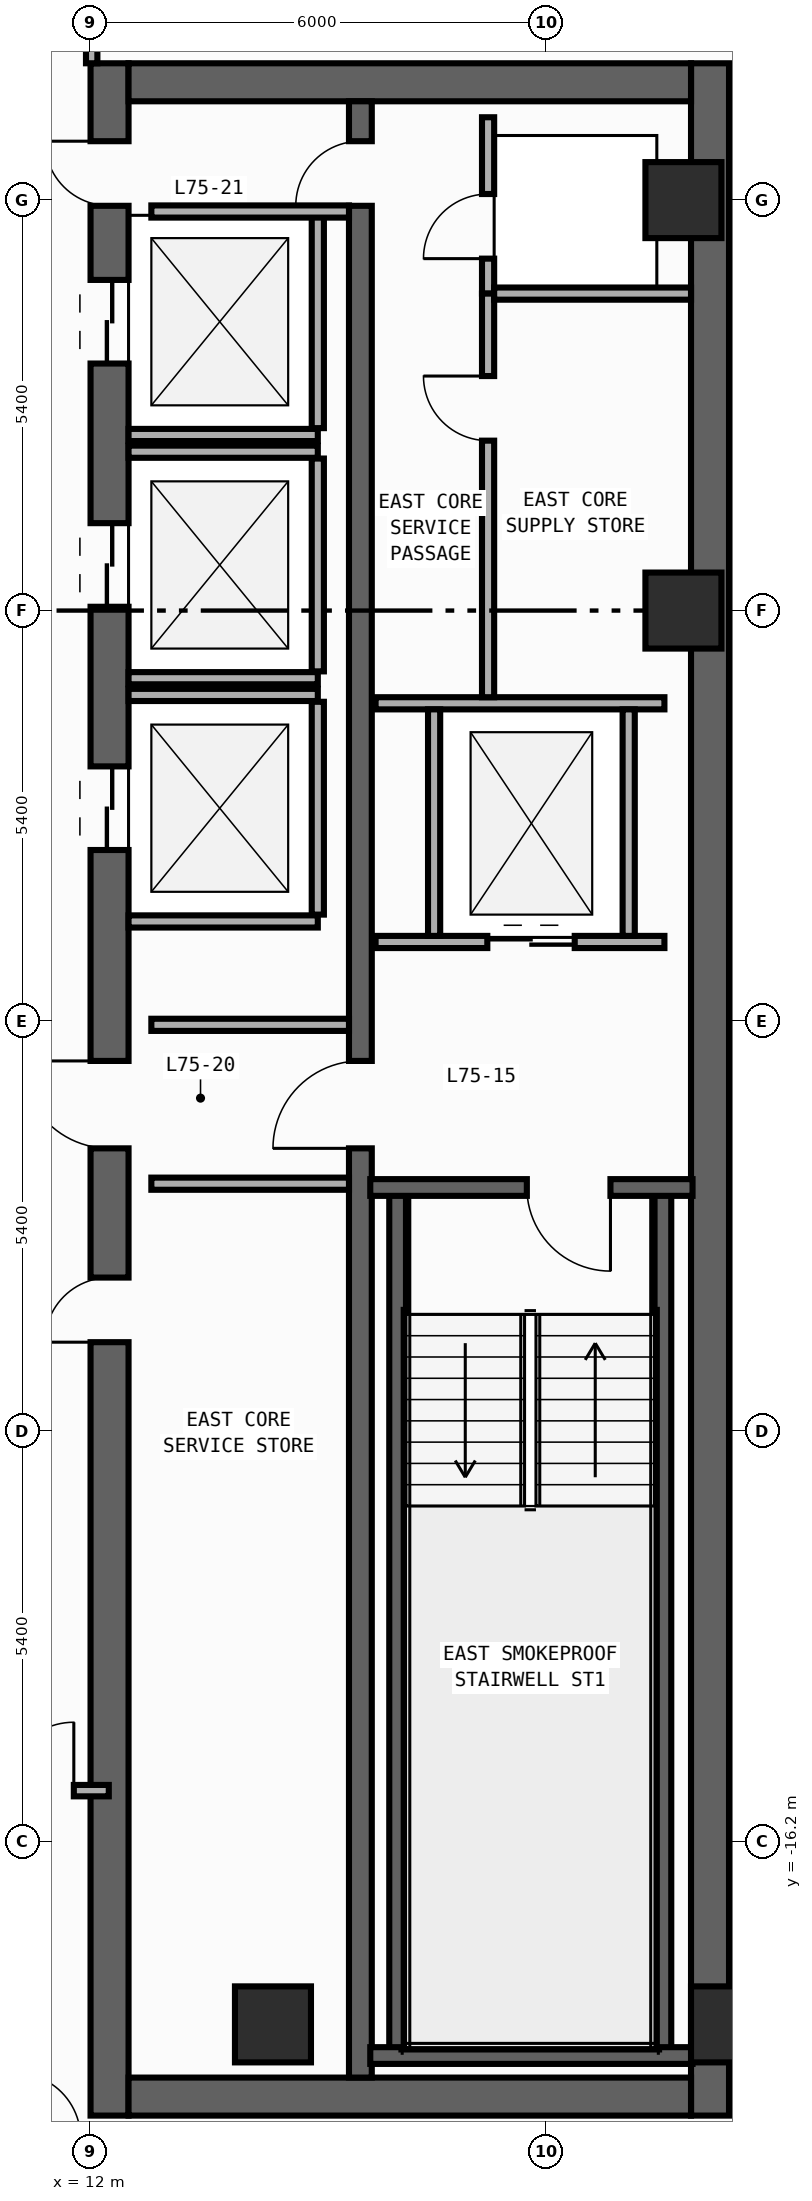
"""IFC4 building model, lengths in metres.
Left out: names, types, materials, properties, quantities, classifications, styles, units other than length and angle.
Written with IfcOpenShell. Run it as: python <this file> out.ifc"""

import sys

from ifc_helpers import new_model, si_unit, direction, frame, frame_2d, origin, origin_2d, place, context, subcontext, project, spatial, rectangle, circle, extrude, element, fill, save


model = new_model("IFC4")
c1 = context("Model", 3, precision=1e-05, world=origin(), true_north=direction((0.0, 1.0)))
c2 = subcontext(c1, "Body", "Model", "MODEL_VIEW")
j1 = project(units=[si_unit("LENGTHUNIT", "METRE"), si_unit("PLANEANGLEUNIT", "RADIAN")], contexts=[c1])
p1 = place(None, origin())
s1 = spatial("IfcSite", under=j1, at=p1, CompositionType="ELEMENT")
p2 = place(p1, origin())
s2 = spatial("IfcBuilding", under=s1, at=p2, CompositionType="ELEMENT")
p3 = place(p2, frame((0.0, 0.0, 311.8)))
s3 = spatial("IfcBuildingStorey", under=s2, at=p3, CompositionType="ELEMENT", Elevation=311.8)
p4 = place(p3, frame((12.25, -19.8, 0.0), z_axis=(0.0, 0.0, 1.0), x_axis=(0.0, 1.0, 0.0)))
e1 = element("IfcWall", 1, at=p4, inside=s3, PredefinedType="SHEAR", context=c2, shape_type="SweptSolid", body=[
    extrude(rectangle(XDim=27.0, YDim=0.5, at=frame_2d((13.5, 0.0))), origin(), (0.0, 0.0, 1.0), 3.54),
])
p5 = place(p4, frame((23.05, 0.0, 0.0)))
e2 = element("IfcOpeningElement", 2, at=p5, cuts=e1, PredefinedType="OPENING", context=c2, shape_type="SweptSolid", body=[
    extrude(rectangle(XDim=1.1, YDim=2.2, at=frame_2d((0.55, 1.1))), frame((0.0, 0.26, 0.0), z_axis=(0.0, -1.0, 0.0), x_axis=(1.0, 0.0, 0.0)), (0.0, 0.0, 1.0), 0.52),
])
p6 = place(p4, frame((19.85, 0.0, 0.0)))
e3 = element("IfcOpeningElement", 3, at=p6, cuts=e1, PredefinedType="OPENING", context=c2, shape_type="SweptSolid", body=[
    extrude(rectangle(XDim=1.1, YDim=2.2, at=frame_2d((0.55, 1.1))), frame((0.0, 0.26, 0.0), z_axis=(0.0, -1.0, 0.0), x_axis=(1.0, 0.0, 0.0)), (0.0, 0.0, 1.0), 0.52),
])
p7 = place(p4, frame((16.65, 0.0, 0.0)))
e4 = element("IfcOpeningElement", 4, at=p7, cuts=e1, PredefinedType="OPENING", context=c2, shape_type="SweptSolid", body=[
    extrude(rectangle(XDim=1.1, YDim=2.2, at=frame_2d((0.55, 1.1))), frame((0.0, 0.26, 0.0), z_axis=(0.0, -1.0, 0.0), x_axis=(1.0, 0.0, 0.0)), (0.0, 0.0, 1.0), 0.52),
])
p8 = place(p4, frame((10.175, 0.0, 0.0)))
e5 = element("IfcOpeningElement", 5, at=p8, cuts=e1, PredefinedType="OPENING", context=c2, shape_type="SweptSolid", body=[
    extrude(rectangle(XDim=0.85, YDim=2.1, at=frame_2d((0.425, 1.05))), frame((0.0, 0.26, 0.0), z_axis=(0.0, -1.0, 0.0), x_axis=(1.0, 0.0, 0.0)), (0.0, 0.0, 1.0), 0.52),
])
p9 = place(p4, frame((12.725, 0.0, 0.0)))
e6 = element("IfcOpeningElement", 6, at=p9, cuts=e1, PredefinedType="OPENING", context=c2, shape_type="SweptSolid", body=[
    extrude(rectangle(XDim=1.15, YDim=2.2, at=frame_2d((0.575, 1.1))), frame((0.0, 0.26, 0.0), z_axis=(0.0, -1.0, 0.0), x_axis=(1.0, 0.0, 0.0)), (0.0, 0.0, 1.0), 0.52),
])
p10 = place(p4, frame((25.125, 0.0, 0.0)))
e7 = element("IfcOpeningElement", 7, at=p10, cuts=e1, PredefinedType="OPENING", context=c2, shape_type="SweptSolid", body=[
    extrude(rectangle(XDim=0.85, YDim=2.1, at=frame_2d((0.425, 1.05))), frame((0.0, 0.26, 0.0), z_axis=(0.0, -1.0, 0.0), x_axis=(1.0, 0.0, 0.0)), (0.0, 0.0, 1.0), 0.52),
])
p11 = place(p3, frame((20.15, -19.8, 0.0), z_axis=(0.0, 0.0, 1.0), x_axis=(0.0, 1.0, 0.0)))
e8 = element("IfcWall", 8, at=p11, inside=s3, PredefinedType="SHEAR", context=c2, shape_type="SweptSolid", body=[
    extrude(rectangle(XDim=27.0, YDim=0.5, at=frame_2d((13.5, 0.0))), origin(), (0.0, 0.0, 1.0), 3.54),
])
for number, where, z_axis, x_axis in (
    (9, (12.5, -19.55, 0.0), (0.0, 0.0, 1.0), (1.0, 0.0, 0.0)),
    (10, (12.5, 6.95, 0.0), (0.0, 0.0, 1.0), (1.0, 0.0, 0.0)),
):
    element("IfcWall", number, at=place(p3, frame(where, z_axis=z_axis, x_axis=x_axis)), inside=s3, PredefinedType="SHEAR", context=c2, shape_type="SweptSolid", body=[
        extrude(rectangle(XDim=7.4, YDim=0.5, at=frame_2d((3.7, 0.0))), origin(), (0.0, 0.0, 1.0), 3.54),
    ])
p12 = place(p3, frame((15.55, -19.3, 0.0), z_axis=(0.0, 0.0, 1.0), x_axis=(0.0, 1.0, 0.0)))
e11 = element("IfcWall", 11, at=p12, inside=s3, PredefinedType="SHEAR", context=c2, shape_type="SweptSolid", body=[
    extrude(rectangle(XDim=26.0, YDim=0.3, at=frame_2d((13.0, 0.0))), origin(), (0.0, 0.0, 1.0), 3.54),
])
p13 = place(p12, frame((12.225, 0.0, 0.0)))
e12 = element("IfcOpeningElement", 12, at=p13, cuts=e11, PredefinedType="OPENING", context=c2, shape_type="SweptSolid", body=[
    extrude(rectangle(XDim=1.15, YDim=2.2, at=frame_2d((0.575, 1.1))), frame((0.0, 0.16, 0.0), z_axis=(0.0, -1.0, 0.0), x_axis=(1.0, 0.0, 0.0)), (0.0, 0.0, 1.0), 0.32),
])
p14 = place(p12, frame((24.625, 0.0, 0.0)))
e13 = element("IfcOpeningElement", 13, at=p14, cuts=e11, PredefinedType="OPENING", context=c2, shape_type="SweptSolid", body=[
    extrude(rectangle(XDim=0.85, YDim=2.1, at=frame_2d((0.425, 1.05))), frame((0.0, 0.16, 0.0), z_axis=(0.0, -1.0, 0.0), x_axis=(1.0, 0.0, 0.0)), (0.0, 0.0, 1.0), 0.32),
])
for number, where, z_axis, x_axis in (
    (14, (16.04, -19.01, 0.0), (0.0, 0.0, 1.0), (0.0, 1.0, 0.0)),
    (15, (19.53, -19.01, 0.0), (0.0, 0.0, 1.0), (0.0, 1.0, 0.0)),
):
    element("IfcWall", number, at=place(p3, frame(where, z_axis=z_axis, x_axis=x_axis)), inside=s3, PredefinedType="SHEAR", context=c2, shape_type="SweptSolid", body=[
        extrude(rectangle(XDim=11.42, YDim=0.22, at=frame_2d((5.71, 0.0))), origin(), (0.0, 0.0, 1.0), 3.54),
    ])
p15 = place(p3, frame((15.68, -19.01, 0.0), z_axis=(0.0, 0.0, 1.0), x_axis=(1.0, 0.0, 0.0)))
e16 = element("IfcWall", 16, at=p15, inside=s3, PredefinedType="SHEAR", context=c2, shape_type="SweptSolid", body=[
    extrude(rectangle(XDim=4.24, YDim=0.22, at=frame_2d((2.12, 0.0))), origin(), (0.0, 0.0, 1.0), 3.54),
])
p16 = place(p3, frame((19.92, -7.59, 0.0), z_axis=(0.0, 0.0, 1.0), x_axis=(-1.0, 0.0, 0.0)))
e17 = element("IfcWall", 17, at=p16, inside=s3, PredefinedType="SHEAR", context=c2, shape_type="SweptSolid", body=[
    extrude(rectangle(XDim=4.24, YDim=0.22, at=frame_2d((2.12, 0.0))), origin(), (0.0, 0.0, 1.0), 3.54),
])
p17 = place(p16, frame((1.08, 0.0, 0.0)))
e18 = element("IfcOpeningElement", 18, at=p17, cuts=e17, PredefinedType="OPENING", context=c2, shape_type="SweptSolid", body=[
    extrude(rectangle(XDim=1.1, YDim=2.2, at=frame_2d((0.55, 1.1))), frame((0.0, 0.12, 0.0), z_axis=(0.0, -1.0, 0.0), x_axis=(1.0, 0.0, 0.0)), (0.0, 0.0, 1.0), 0.24),
])
for number, where, z_axis, x_axis in (
    (19, (20.4, -18.6, 0.0), (0.0, 0.0, 1.0), (1.0, 0.0, 0.0)),
    (20, (14.4, -18.6, 0.0), (0.0, 0.0, 1.0), (1.0, 0.0, 0.0)),
    (21, (19.8, 0.0, 0.0), (0.0, 0.0, 1.0), (1.0, 0.0, 0.0)),
    (22, (19.8, 5.4, 0.0), (0.0, 0.0, 1.0), (1.0, 0.0, 0.0)),
):
    element("IfcColumn", number, at=place(p3, frame(where, z_axis=z_axis, x_axis=x_axis)), inside=s3, PredefinedType="COLUMN", context=c2, shape_type="SweptSolid", body=[
        extrude(circle(Radius=0.5, at=origin_2d()), origin(), (0.0, 0.0, 1.0), 3.8),
    ])
p18 = place(p3, frame((12.5, 2.31, 0.0), z_axis=(0.0, 0.0, 1.0), x_axis=(1.0, 0.0, 0.0)))
e23 = element("IfcWall", 23, at=p18, inside=s3, PredefinedType="STANDARD", context=c2, shape_type="SweptSolid", body=[
    extrude(rectangle(XDim=2.49, YDim=0.16, at=frame_2d((1.245, 0.0))), origin(), (0.0, 0.0, 1.0), 3.54),
])
p19 = place(p3, frame((14.99, 2.4, 0.0), z_axis=(0.0, 0.0, 1.0), x_axis=(0.0, 1.0, 0.0)))
e24 = element("IfcWall", 24, at=p19, inside=s3, PredefinedType="STANDARD", context=c2, shape_type="SweptSolid", body=[
    extrude(rectangle(XDim=2.8, YDim=0.16, at=frame_2d((1.4, 0.0))), origin(), (0.0, 0.0, 1.0), 3.54),
])
for number, where, z_axis, x_axis in (
    (25, (12.5, -0.89, 0.0), (0.0, 0.0, 1.0), (1.0, 0.0, 0.0)),
    (26, (12.5, 2.09, 0.0), (0.0, 0.0, 1.0), (1.0, 0.0, 0.0)),
):
    element("IfcWall", number, at=place(p3, frame(where, z_axis=z_axis, x_axis=x_axis)), inside=s3, PredefinedType="STANDARD", context=c2, shape_type="SweptSolid", body=[
        extrude(rectangle(XDim=2.49, YDim=0.16, at=frame_2d((1.245, 0.0))), origin(), (0.0, 0.0, 1.0), 3.54),
    ])
p20 = place(p3, frame((14.99, -0.8, 0.0), z_axis=(0.0, 0.0, 1.0), x_axis=(0.0, 1.0, 0.0)))
e27 = element("IfcWall", 27, at=p20, inside=s3, PredefinedType="STANDARD", context=c2, shape_type="SweptSolid", body=[
    extrude(rectangle(XDim=2.8, YDim=0.16, at=frame_2d((1.4, 0.0))), origin(), (0.0, 0.0, 1.0), 3.54),
])
for number, where, z_axis, x_axis in (
    (28, (12.5, -4.09, 0.0), (0.0, 0.0, 1.0), (1.0, 0.0, 0.0)),
    (29, (12.5, -1.11, 0.0), (0.0, 0.0, 1.0), (1.0, 0.0, 0.0)),
):
    element("IfcWall", number, at=place(p3, frame(where, z_axis=z_axis, x_axis=x_axis)), inside=s3, PredefinedType="STANDARD", context=c2, shape_type="SweptSolid", body=[
        extrude(rectangle(XDim=2.49, YDim=0.16, at=frame_2d((1.245, 0.0))), origin(), (0.0, 0.0, 1.0), 3.54),
    ])
p21 = place(p3, frame((14.99, -4.0, 0.0), z_axis=(0.0, 0.0, 1.0), x_axis=(0.0, 1.0, 0.0)))
e30 = element("IfcWall", 30, at=p21, inside=s3, PredefinedType="STANDARD", context=c2, shape_type="SweptSolid", body=[
    extrude(rectangle(XDim=2.8, YDim=0.16, at=frame_2d((1.4, 0.0))), origin(), (0.0, 0.0, 1.0), 3.54),
])
p22 = place(p3, frame((15.75, -4.36, 0.0), z_axis=(0.0, 0.0, 1.0), x_axis=(1.0, 0.0, 0.0)))
e31 = element("IfcWall", 31, at=p22, inside=s3, PredefinedType="STANDARD", context=c2, shape_type="SweptSolid", body=[
    extrude(rectangle(XDim=3.8, YDim=0.16, at=frame_2d((1.9, 0.0))), origin(), (0.0, 0.0, 1.0), 3.54),
])
p23 = place(p22, frame((1.47, 0.0, 0.0)))
e32 = element("IfcOpeningElement", 32, at=p23, cuts=e31, PredefinedType="OPENING", context=c2, shape_type="SweptSolid", body=[
    extrude(rectangle(XDim=1.15, YDim=2.2, at=frame_2d((0.575, 1.1))), frame((0.0, 0.09, 0.0), z_axis=(0.0, -1.0, 0.0), x_axis=(1.0, 0.0, 0.0)), (0.0, 0.0, 1.0), 0.18),
])
p24 = place(p3, frame((15.75, -1.22, 0.0), z_axis=(0.0, 0.0, 1.0), x_axis=(1.0, 0.0, 0.0)))
e33 = element("IfcWall", 33, at=p24, inside=s3, PredefinedType="STANDARD", context=c2, shape_type="SweptSolid", body=[
    extrude(rectangle(XDim=3.8, YDim=0.16, at=frame_2d((1.9, 0.0))), origin(), (0.0, 0.0, 1.0), 3.54),
])
for number, where, z_axis, x_axis in (
    (34, (16.52, -4.28, 0.0), (0.0, 0.0, 1.0), (0.0, 1.0, 0.0)),
    (35, (19.08, -4.28, 0.0), (0.0, 0.0, 1.0), (0.0, 1.0, 0.0)),
):
    element("IfcWall", number, at=place(p3, frame(where, z_axis=z_axis, x_axis=x_axis)), inside=s3, PredefinedType="STANDARD", context=c2, shape_type="SweptSolid", body=[
        extrude(rectangle(XDim=2.98, YDim=0.16, at=frame_2d((1.49, 0.0))), origin(), (0.0, 0.0, 1.0), 3.54),
    ])
for number, where, z_axis, x_axis in (
    (36, (12.8, -5.45, 0.0), (0.0, 0.0, 1.0), (1.0, 0.0, 0.0)),
    (37, (12.8, -7.54, 0.0), (0.0, 0.0, 1.0), (1.0, 0.0, 0.0)),
    (38, (12.8, 5.25, 0.0), (0.0, 0.0, 1.0), (1.0, 0.0, 0.0)),
):
    element("IfcWall", number, at=place(p3, frame(where, z_axis=z_axis, x_axis=x_axis)), inside=s3, PredefinedType="STANDARD", context=c2, shape_type="SweptSolid", body=[
        extrude(rectangle(XDim=2.6, YDim=0.16, at=frame_2d((1.3, 0.0))), origin(), (0.0, 0.0, 1.0), 3.54),
    ])
p25 = place(p3, frame((17.23, 4.17, 0.0), z_axis=(0.0, 0.0, 1.0), x_axis=(0.0, 1.0, 0.0)))
e39 = element("IfcWall", 39, at=p25, inside=s3, PredefinedType="PARTITIONING", context=c2, shape_type="SweptSolid", body=[
    extrude(rectangle(XDim=2.32, YDim=0.16, at=frame_2d((1.16, 0.0))), origin(), (0.0, 0.0, 1.0), 3.54),
])
p26 = place(p25, frame((0.46, 0.0, 0.0)))
e40 = element("IfcOpeningElement", 40, at=p26, cuts=e39, PredefinedType="OPENING", context=c2, shape_type="SweptSolid", body=[
    extrude(rectangle(XDim=0.85, YDim=2.1, at=frame_2d((0.425, 1.05))), frame((0.0, 0.09, 0.0), z_axis=(0.0, -1.0, 0.0), x_axis=(1.0, 0.0, 0.0)), (0.0, 0.0, 1.0), 0.18),
])
p27 = place(p3, frame((17.23, -1.14, 0.0), z_axis=(0.0, 0.0, 1.0), x_axis=(0.0, 1.0, 0.0)))
e41 = element("IfcWall", 41, at=p27, inside=s3, PredefinedType="PARTITIONING", context=c2, shape_type="SweptSolid", body=[
    extrude(rectangle(XDim=5.31, YDim=0.16, at=frame_2d((2.655, 0.0))), origin(), (0.0, 0.0, 1.0), 3.54),
])
p28 = place(p27, frame((3.375, 0.0, 0.0)))
e42 = element("IfcOpeningElement", 42, at=p28, cuts=e41, PredefinedType="OPENING", context=c2, shape_type="SweptSolid", body=[
    extrude(rectangle(XDim=0.85, YDim=2.1, at=frame_2d((0.425, 1.05))), frame((0.0, 0.09, 0.0), z_axis=(0.0, -1.0, 0.0), x_axis=(1.0, 0.0, 0.0)), (0.0, 0.0, 1.0), 0.18),
])
p29 = place(p3, frame((17.31, 4.17, 0.0), z_axis=(0.0, 0.0, 1.0), x_axis=(1.0, 0.0, 0.0)))
e43 = element("IfcWall", 43, at=p29, inside=s3, PredefinedType="PARTITIONING", context=c2, shape_type="SweptSolid", body=[
    extrude(rectangle(XDim=2.59, YDim=0.16, at=frame_2d((1.295, 0.0))), origin(), (0.0, 0.0, 1.0), 3.54),
])
p30 = place(p3, frame((12.015, 7.2, 0.0), z_axis=(0.0, 0.0, 1.0), x_axis=(0.0, 1.0, 0.0)))
e44 = element("IfcWall", 44, at=p30, inside=s3, PredefinedType="PARTITIONING", context=c2, shape_type="SweptSolid", body=[
    extrude(rectangle(XDim=6.68, YDim=0.15, at=frame_2d((3.34, 0.0))), origin(), (0.0, 0.0, 1.0), 3.54),
])
p31 = place(p30, frame((0.67, 0.0, 0.0)))
e45 = element("IfcOpeningElement", 45, at=p31, cuts=e44, PredefinedType="OPENING", context=c2, shape_type="SweptSolid", body=[
    extrude(rectangle(XDim=0.9, YDim=2.15, at=frame_2d((0.45, 1.075))), frame((0.0, 0.085, 0.0), z_axis=(0.0, -1.0, 0.0), x_axis=(1.0, 0.0, 0.0)), (0.0, 0.0, 1.0), 0.17),
])
p32 = place(p3, frame((2.19, -15.525, 0.0), z_axis=(0.0, 0.0, 1.0), x_axis=(1.0, 0.0, 0.0)))
e46 = element("IfcWall", 46, at=p32, inside=s3, PredefinedType="PARTITIONING", context=c2, shape_type="SweptSolid", body=[
    extrude(rectangle(XDim=10.05, YDim=0.15, at=frame_2d((5.025, 0.0))), origin(), (0.0, 0.0, 1.0), 3.54),
])
p33 = place(p32, frame((8.69, 0.0, 0.0)))
e47 = element("IfcOpeningElement", 47, at=p33, cuts=e46, PredefinedType="OPENING", context=c2, shape_type="SweptSolid", body=[
    extrude(rectangle(XDim=0.9, YDim=2.15, at=frame_2d((0.45, 1.075))), frame((0.0, 0.085, 0.0), z_axis=(0.0, -1.0, 0.0), x_axis=(1.0, 0.0, 0.0)), (0.0, 0.0, 1.0), 0.17),
])
p34 = place(p17, origin())
e48 = element("IfcDoor", 48, at=p34, inside=s3, OperationType="SINGLE_SWING_LEFT", PredefinedType="DOOR", context=c2, shape_type="SweptSolid", body=[
    extrude(rectangle(XDim=1.1, YDim=2.2, at=frame_2d((0.55, 1.1))), frame((0.0, 0.025, 0.0), z_axis=(0.0, -1.0, 0.0), x_axis=(1.0, 0.0, 0.0)), (0.0, 0.0, 1.0), 0.05),
])
fill(e18, e48)
p35 = place(p5, origin())
e49 = element("IfcDoor", 49, at=p35, inside=s3, OperationType="DOUBLE_DOOR_SLIDING", PredefinedType="DOOR", context=c2, shape_type="SweptSolid", body=[
    extrude(rectangle(XDim=1.1, YDim=2.2, at=frame_2d((0.55, 1.1))), frame((0.0, 0.025, 0.0), z_axis=(0.0, -1.0, 0.0), x_axis=(1.0, 0.0, 0.0)), (0.0, 0.0, 1.0), 0.05),
])
fill(e2, e49)
p36 = place(p6, origin())
e50 = element("IfcDoor", 50, at=p36, inside=s3, OperationType="DOUBLE_DOOR_SLIDING", PredefinedType="DOOR", context=c2, shape_type="SweptSolid", body=[
    extrude(rectangle(XDim=1.1, YDim=2.2, at=frame_2d((0.55, 1.1))), frame((0.0, 0.025, 0.0), z_axis=(0.0, -1.0, 0.0), x_axis=(1.0, 0.0, 0.0)), (0.0, 0.0, 1.0), 0.05),
])
fill(e3, e50)
p37 = place(p7, origin())
e51 = element("IfcDoor", 51, at=p37, inside=s3, OperationType="DOUBLE_DOOR_SLIDING", PredefinedType="DOOR", context=c2, shape_type="SweptSolid", body=[
    extrude(rectangle(XDim=1.1, YDim=2.2, at=frame_2d((0.55, 1.1))), frame((0.0, 0.025, 0.0), z_axis=(0.0, -1.0, 0.0), x_axis=(1.0, 0.0, 0.0)), (0.0, 0.0, 1.0), 0.05),
])
fill(e4, e51)
p38 = place(p8, origin())
e52 = element("IfcDoor", 52, at=p38, inside=s3, OperationType="SINGLE_SWING_LEFT", PredefinedType="DOOR", context=c2, shape_type="SweptSolid", body=[
    extrude(rectangle(XDim=0.85, YDim=2.1, at=frame_2d((0.425, 1.05))), frame((0.0, 0.025, 0.0), z_axis=(0.0, -1.0, 0.0), x_axis=(1.0, 0.0, 0.0)), (0.0, 0.0, 1.0), 0.05),
])
fill(e5, e52)
p39 = place(p9, origin())
e53 = element("IfcDoor", 53, at=p39, inside=s3, OperationType="SINGLE_SWING_RIGHT", PredefinedType="DOOR", context=c2, shape_type="SweptSolid", body=[
    extrude(rectangle(XDim=1.15, YDim=2.2, at=frame_2d((0.575, 1.1))), frame((0.0, 0.025, 0.0), z_axis=(0.0, -1.0, 0.0), x_axis=(1.0, 0.0, 0.0)), (0.0, 0.0, 1.0), 0.05),
])
fill(e6, e53)
p40 = place(p13, origin())
e54 = element("IfcDoor", 54, at=p40, inside=s3, OperationType="SINGLE_SWING_LEFT", PredefinedType="DOOR", context=c2, shape_type="SweptSolid", body=[
    extrude(rectangle(XDim=1.15, YDim=2.2, at=frame_2d((0.575, 1.1))), frame((0.0, 0.025, 0.0), z_axis=(0.0, -1.0, 0.0), x_axis=(1.0, 0.0, 0.0)), (0.0, 0.0, 1.0), 0.05),
])
fill(e12, e54)
p41 = place(p10, origin())
e55 = element("IfcDoor", 55, at=p41, inside=s3, OperationType="SINGLE_SWING_RIGHT", PredefinedType="DOOR", context=c2, shape_type="SweptSolid", body=[
    extrude(rectangle(XDim=0.85, YDim=2.1, at=frame_2d((0.425, 1.05))), frame((0.0, 0.025, 0.0), z_axis=(0.0, -1.0, 0.0), x_axis=(1.0, 0.0, 0.0)), (0.0, 0.0, 1.0), 0.05),
])
fill(e7, e55)
p42 = place(p14, origin())
e56 = element("IfcDoor", 56, at=p42, inside=s3, OperationType="SINGLE_SWING_LEFT", PredefinedType="DOOR", context=c2, shape_type="SweptSolid", body=[
    extrude(rectangle(XDim=0.85, YDim=2.1, at=frame_2d((0.425, 1.05))), frame((0.0, 0.025, 0.0), z_axis=(0.0, -1.0, 0.0), x_axis=(1.0, 0.0, 0.0)), (0.0, 0.0, 1.0), 0.05),
])
fill(e13, e56)
p43 = place(p23, origin())
e57 = element("IfcDoor", 57, at=p43, inside=s3, OperationType="DOUBLE_DOOR_SLIDING", PredefinedType="DOOR", context=c2, shape_type="SweptSolid", body=[
    extrude(rectangle(XDim=1.15, YDim=2.2, at=frame_2d((0.575, 1.1))), frame((0.0, 0.025, 0.0), z_axis=(0.0, -1.0, 0.0), x_axis=(1.0, 0.0, 0.0)), (0.0, 0.0, 1.0), 0.05),
])
fill(e32, e57)
p44 = place(p26, origin())
e58 = element("IfcDoor", 58, at=p44, inside=s3, OperationType="SINGLE_SWING_LEFT", PredefinedType="DOOR", context=c2, shape_type="SweptSolid", body=[
    extrude(rectangle(XDim=0.85, YDim=2.1, at=frame_2d((0.425, 1.05))), frame((0.0, 0.025, 0.0), z_axis=(0.0, -1.0, 0.0), x_axis=(1.0, 0.0, 0.0)), (0.0, 0.0, 1.0), 0.05),
])
fill(e40, e58)
p45 = place(p28, origin())
e59 = element("IfcDoor", 59, at=p45, inside=s3, OperationType="SINGLE_SWING_RIGHT", PredefinedType="DOOR", context=c2, shape_type="SweptSolid", body=[
    extrude(rectangle(XDim=0.85, YDim=2.1, at=frame_2d((0.425, 1.05))), frame((0.0, 0.025, 0.0), z_axis=(0.0, -1.0, 0.0), x_axis=(1.0, 0.0, 0.0)), (0.0, 0.0, 1.0), 0.05),
])
fill(e42, e59)
p46 = place(p33, origin())
e60 = element("IfcDoor", 60, at=p46, inside=s3, OperationType="SINGLE_SWING_RIGHT", PredefinedType="DOOR", context=c2, shape_type="SweptSolid", body=[
    extrude(rectangle(XDim=0.9, YDim=2.15, at=frame_2d((0.45, 1.075))), frame((0.0, 0.025, 0.0), z_axis=(0.0, -1.0, 0.0), x_axis=(1.0, 0.0, 0.0)), (0.0, 0.0, 1.0), 0.05),
])
fill(e47, e60)
save(model, sys.argv[1])
